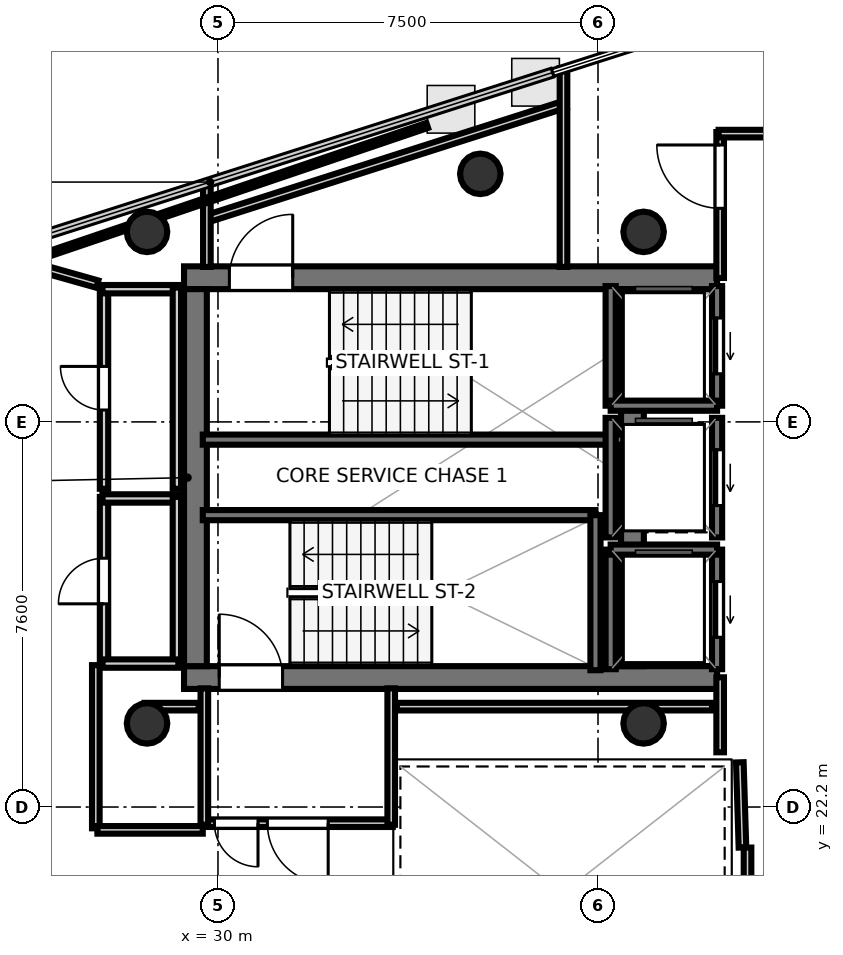
"""IFC4 building model, lengths in metres.
Left out: names, types, materials, properties, quantities, classifications, styles, units other than length and angle.
Written with IfcOpenShell. Run it as: python <this file> out.ifc"""

import sys

from ifc_helpers import new_model, si_unit, direction, frame, frame_2d, origin, origin_2d, place, context, subcontext, project, spatial, rectangle, hollow_circle, extrude, element, fill, save


model = new_model("IFC4")
c1 = context("Model", 3, precision=1e-05, world=origin(), true_north=direction((0.0, 1.0)))
c2 = subcontext(c1, "Body", "Model", "MODEL_VIEW")
j1 = project(units=[si_unit("LENGTHUNIT", "METRE"), si_unit("PLANEANGLEUNIT", "RADIAN")], contexts=[c1])
p1 = place(None, origin())
s1 = spatial("IfcSite", under=j1, at=p1, CompositionType="ELEMENT")
p2 = place(p1, origin())
s2 = spatial("IfcBuilding", under=s1, at=p2, CompositionType="ELEMENT")
p3 = place(p2, frame((0.0, 0.0, 329.6)))
s3 = spatial("IfcBuildingStorey", under=s2, at=p3, CompositionType="ELEMENT", Elevation=329.6)
p4 = place(p3, frame((29.33, 32.645, 0.0), z_axis=(0.0, 0.0, 1.0), x_axis=(1.0, 0.0, 0.0)))
e1 = element("IfcWall", 1, at=p4, inside=s3, PredefinedType="SHEAR", context=c2, shape_type="SweptSolid", body=[
    extrude(rectangle(XDim=10.52, YDim=0.45, at=frame_2d((5.26, 0.0))), origin(), (0.0, 0.0, 1.0), 3.52),
])
p5 = place(p4, frame((0.895, 0.0, 0.0)))
e2 = element("IfcOpeningElement", 2, at=p5, cuts=e1, PredefinedType="OPENING", context=c2, shape_type="SweptSolid", body=[
    extrude(rectangle(XDim=1.25, YDim=2.15, at=frame_2d((0.625, 1.075))), frame((0.0, 0.235, 0.0), z_axis=(0.0, -1.0, 0.0), x_axis=(1.0, 0.0, 0.0)), (0.0, 0.0, 1.0), 0.47),
])
p6 = place(p3, frame((29.33, 24.755, 0.0), z_axis=(0.0, 0.0, 1.0), x_axis=(1.0, 0.0, 0.0)))
e3 = element("IfcWall", 3, at=p6, inside=s3, PredefinedType="SHEAR", context=c2, shape_type="SweptSolid", body=[
    extrude(rectangle(XDim=10.52, YDim=0.45, at=frame_2d((5.26, 0.0))), origin(), (0.0, 0.0, 1.0), 3.52),
])
p7 = place(p6, frame((0.695, 0.0, 0.0)))
e4 = element("IfcOpeningElement", 4, at=p7, cuts=e3, PredefinedType="OPENING", context=c2, shape_type="SweptSolid", body=[
    extrude(rectangle(XDim=1.25, YDim=2.15, at=frame_2d((0.625, 1.075))), frame((0.0, 0.235, 0.0), z_axis=(0.0, -1.0, 0.0), x_axis=(1.0, 0.0, 0.0)), (0.0, 0.0, 1.0), 0.47),
])
for number, where, z_axis, x_axis in (
    (5, (29.555, 24.98, 0.0), (0.0, 0.0, 1.0), (0.0, 1.0, 0.0)),
    (6, (38.18, 24.98, 0.0), (0.0, 0.0, 1.0), (0.0, 1.0, 0.0)),
):
    element("IfcWall", number, at=place(p3, frame(where, z_axis=z_axis, x_axis=x_axis)), inside=s3, PredefinedType="SHEAR", context=c2, shape_type="SweptSolid", body=[
        extrude(rectangle(XDim=7.44, YDim=0.45, at=frame_2d((3.72, 0.0))), origin(), (0.0, 0.0, 1.0), 3.52),
    ])
for number, where, z_axis, x_axis in (
    (7, (28.6, 33.55, 0.0), (0.0, 0.0, 1.0), (1.0, 0.0, 0.0)),
    (8, (28.6, 23.85, 0.0), (0.0, 0.0, 1.0), (1.0, 0.0, 0.0)),
    (9, (38.4, 33.55, 0.0), (0.0, 0.0, 1.0), (1.0, 0.0, 0.0)),
    (10, (38.4, 23.85, 0.0), (0.0, 0.0, 1.0), (1.0, 0.0, 0.0)),
    (11, (35.177, 34.695, 0.0), (0.0, 0.0, 1.0), (1.0, 0.0, 0.0)),
):
    element("IfcColumn", number, at=place(p3, frame(where, z_axis=z_axis, x_axis=x_axis)), inside=s3, PredefinedType="COLUMN", context=c2, shape_type="SweptSolid", body=[
        extrude(hollow_circle(Radius=0.4, WallThickness=0.022, at=origin_2d()), origin(), (0.0, 0.0, 1.0), 3.7),
    ])
p8 = place(p3, frame((29.7, 29.45, 0.0), z_axis=(0.0, 0.0, 1.0), x_axis=(1.0, 0.0, 0.0)))
e12 = element("IfcWall", 12, at=p8, inside=s3, PredefinedType="SOLIDWALL", context=c2, shape_type="SweptSolid", body=[
    extrude(rectangle(XDim=8.3, YDim=0.2, at=frame_2d((4.15, 0.0))), origin(), (0.0, 0.0, 1.0), 3.52),
])
p9 = place(p3, frame((29.7, 27.96, 0.0), z_axis=(0.0, 0.0, 1.0), x_axis=(1.0, 0.0, 0.0)))
e13 = element("IfcWall", 13, at=p9, inside=s3, PredefinedType="SOLIDWALL", context=c2, shape_type="SweptSolid", body=[
    extrude(rectangle(XDim=7.75, YDim=0.2, at=frame_2d((3.875, 0.0))), origin(), (0.0, 0.0, 1.0), 3.52),
])
p10 = place(p3, frame((37.45, 24.9, 0.0), z_axis=(0.0, 0.0, 1.0), x_axis=(0.0, 1.0, 0.0)))
e14 = element("IfcWall", 14, at=p10, inside=s3, PredefinedType="SOLIDWALL", context=c2, shape_type="SweptSolid", body=[
    extrude(rectangle(XDim=3.06, YDim=0.2, at=frame_2d((1.53, 0.0))), origin(), (0.0, 0.0, 1.0), 3.52),
])
p11 = place(p3, frame((39.85, 30.12, 0.0), z_axis=(0.0, 0.0, 1.0), x_axis=(0.0, 1.0, 0.0)))
e15 = element("IfcWall", 15, at=p11, inside=s3, PredefinedType="SOLIDWALL", context=c2, shape_type="SweptSolid", body=[
    extrude(rectangle(XDim=2.36, YDim=0.2, at=frame_2d((1.18, 0.0))), origin(), (0.0, 0.0, 1.0), 3.52),
])
p12 = place(p11, frame((0.63, 0.0, 0.0)))
e16 = element("IfcOpeningElement", 16, at=p12, cuts=e15, PredefinedType="OPENING", context=c2, shape_type="SweptSolid", body=[
    extrude(rectangle(XDim=1.1, YDim=2.15, at=frame_2d((0.55, 1.075))), frame((0.0, 0.11, 0.0), z_axis=(0.0, -1.0, 0.0), x_axis=(1.0, 0.0, 0.0)), (0.0, 0.0, 1.0), 0.22),
])
p13 = place(p3, frame((37.75, 30.12, 0.0), z_axis=(0.0, 0.0, 1.0), x_axis=(0.0, 1.0, 0.0)))
e17 = element("IfcWall", 17, at=p13, inside=s3, PredefinedType="SOLIDWALL", context=c2, shape_type="SweptSolid", body=[
    extrude(rectangle(XDim=2.36, YDim=0.2, at=frame_2d((1.18, 0.0))), origin(), (0.0, 0.0, 1.0), 3.52),
])
p14 = place(p3, frame((37.75, 30.12, 0.0), z_axis=(0.0, 0.0, 1.0), x_axis=(1.0, 0.0, 0.0)))
e18 = element("IfcWall", 18, at=p14, inside=s3, PredefinedType="SOLIDWALL", context=c2, shape_type="SweptSolid", body=[
    extrude(rectangle(XDim=2.1, YDim=0.2, at=frame_2d((1.05, 0.0))), origin(), (0.0, 0.0, 1.0), 3.52),
])
p15 = place(p3, frame((39.85, 24.92, 0.0), z_axis=(0.0, 0.0, 1.0), x_axis=(0.0, 1.0, 0.0)))
e19 = element("IfcWall", 19, at=p15, inside=s3, PredefinedType="SOLIDWALL", context=c2, shape_type="SweptSolid", body=[
    extrude(rectangle(XDim=2.36, YDim=0.2, at=frame_2d((1.18, 0.0))), origin(), (0.0, 0.0, 1.0), 3.52),
])
p16 = place(p15, frame((0.63, 0.0, 0.0)))
e20 = element("IfcOpeningElement", 20, at=p16, cuts=e19, PredefinedType="OPENING", context=c2, shape_type="SweptSolid", body=[
    extrude(rectangle(XDim=1.1, YDim=2.15, at=frame_2d((0.55, 1.075))), frame((0.0, 0.11, 0.0), z_axis=(0.0, -1.0, 0.0), x_axis=(1.0, 0.0, 0.0)), (0.0, 0.0, 1.0), 0.22),
])
p17 = place(p3, frame((37.75, 24.92, 0.0), z_axis=(0.0, 0.0, 1.0), x_axis=(0.0, 1.0, 0.0)))
e21 = element("IfcWall", 21, at=p17, inside=s3, PredefinedType="SOLIDWALL", context=c2, shape_type="SweptSolid", body=[
    extrude(rectangle(XDim=2.36, YDim=0.2, at=frame_2d((1.18, 0.0))), origin(), (0.0, 0.0, 1.0), 3.52),
])
p18 = place(p3, frame((37.75, 27.28, 0.0), z_axis=(0.0, 0.0, 1.0), x_axis=(1.0, 0.0, 0.0)))
e22 = element("IfcWall", 22, at=p18, inside=s3, PredefinedType="SOLIDWALL", context=c2, shape_type="SweptSolid", body=[
    extrude(rectangle(XDim=2.1, YDim=0.2, at=frame_2d((1.05, 0.0))), origin(), (0.0, 0.0, 1.0), 3.52),
])
p19 = place(p3, frame((39.85, 27.52, 0.0), z_axis=(0.0, 0.0, 1.0), x_axis=(0.0, 1.0, 0.0)))
e23 = element("IfcWall", 23, at=p19, inside=s3, PredefinedType="SOLIDWALL", context=c2, shape_type="SweptSolid", body=[
    extrude(rectangle(XDim=2.36, YDim=0.2, at=frame_2d((1.18, 0.0))), origin(), (0.0, 0.0, 1.0), 3.52),
])
p20 = place(p19, frame((0.63, 0.0, 0.0)))
e24 = element("IfcOpeningElement", 24, at=p20, cuts=e23, PredefinedType="OPENING", context=c2, shape_type="SweptSolid", body=[
    extrude(rectangle(XDim=1.1, YDim=2.15, at=frame_2d((0.55, 1.075))), frame((0.0, 0.11, 0.0), z_axis=(0.0, -1.0, 0.0), x_axis=(1.0, 0.0, 0.0)), (0.0, 0.0, 1.0), 0.22),
])
p21 = place(p3, frame((37.75, 27.52, 0.0), z_axis=(0.0, 0.0, 1.0), x_axis=(0.0, 1.0, 0.0)))
e25 = element("IfcWall", 25, at=p21, inside=s3, PredefinedType="SOLIDWALL", context=c2, shape_type="SweptSolid", body=[
    extrude(rectangle(XDim=2.36, YDim=0.2, at=frame_2d((1.18, 0.0))), origin(), (0.0, 0.0, 1.0), 3.52),
])
p22 = place(p3, frame((29.76, 33.802, 0.0), z_axis=(0.0, 0.0, 1.0), x_axis=(0.952518417837, 0.304480974252, 0.0)))
e26 = element("IfcWall", 26, at=p22, inside=s3, PredefinedType="PARTITIONING", context=c2, shape_type="SweptSolid", body=[
    extrude(rectangle(XDim=7.454, YDim=0.15, at=frame_2d((3.727, 0.0))), origin(), (0.0, 0.0, 1.0), 2.84),
])
p23 = place(p3, frame((36.819, 36.783, 0.0), z_axis=(0.0, 0.0, 1.0), x_axis=(0.0, -1.0, 0.0)))
e27 = element("IfcWall", 27, at=p23, inside=s3, PredefinedType="PARTITIONING", context=c2, shape_type="SweptSolid", body=[
    extrude(rectangle(XDim=3.925, YDim=0.15, at=frame_2d((1.962, 0.0))), origin(), (0.0, 0.0, 1.0), 2.84),
])
p24 = place(p3, frame((29.781, 32.858, 0.0), z_axis=(0.0, 0.0, 1.0), x_axis=(0.0, 1.0, 0.0)))
e28 = element("IfcWall", 28, at=p24, inside=s3, PredefinedType="PARTITIONING", context=c2, shape_type="SweptSolid", body=[
    extrude(rectangle(XDim=1.675, YDim=0.15, at=frame_2d((0.838, 0.0))), origin(), (0.0, 0.0, 1.0), 2.84),
])
p25 = place(p3, frame((33.45, 21.881, 0.0), z_axis=(0.0, 0.0, 1.0), x_axis=(-1.0, 0.0, 0.0)))
e29 = element("IfcWall", 29, at=p25, inside=s3, PredefinedType="PARTITIONING", context=c2, shape_type="SweptSolid", body=[
    extrude(rectangle(XDim=3.75, YDim=0.15, at=frame_2d((1.875, 0.0))), origin(), (0.0, 0.0, 1.0), 2.84),
])
p26 = place(p25, frame((1.275, 0.0, 0.0)))
e30 = element("IfcOpeningElement", 30, at=p26, cuts=e29, PredefinedType="OPENING", context=c2, shape_type="SweptSolid", body=[
    extrude(rectangle(XDim=1.2, YDim=2.15, at=frame_2d((0.6, 1.075))), frame((0.0, 0.085, 0.0), z_axis=(0.0, -1.0, 0.0), x_axis=(1.0, 0.0, 0.0)), (0.0, 0.0, 1.0), 0.17),
])
p27 = place(p25, frame((2.66, 0.0, 0.0)))
e31 = element("IfcOpeningElement", 31, at=p27, cuts=e29, PredefinedType="OPENING", context=c2, shape_type="SweptSolid", body=[
    extrude(rectangle(XDim=0.86, YDim=2.05, at=frame_2d((0.43, 1.025))), frame((0.0, 0.085, 0.0), z_axis=(0.0, -1.0, 0.0), x_axis=(1.0, 0.0, 0.0)), (0.0, 0.0, 1.0), 0.17),
])
for number, where, z_axis, x_axis in (
    (32, (29.731, 21.85, 0.0), (0.0, 0.0, 1.0), (0.0, 1.0, 0.0)),
    (33, (33.419, 24.542, 0.0), (0.0, 0.0, 1.0), (0.0, -1.0, 0.0)),
):
    element("IfcWall", number, at=place(p3, frame(where, z_axis=z_axis, x_axis=x_axis)), inside=s3, PredefinedType="PARTITIONING", context=c2, shape_type="SweptSolid", body=[
        extrude(rectangle(XDim=2.692, YDim=0.15, at=frame_2d((1.346, 0.0))), origin(), (0.0, 0.0, 1.0), 2.84),
    ])
p28 = place(p3, frame((40.351, 21.401, 0.0), z_axis=(0.0, 0.0, 1.0), x_axis=(-0.031058045979, 0.999517582527, 0.0)))
e34 = element("IfcWall", 34, at=p28, inside=s3, PredefinedType="PARTITIONING", context=c2, shape_type="SweptSolid", body=[
    extrude(rectangle(XDim=1.682, YDim=0.15, at=frame_2d((0.841, 0.0))), origin(), (0.0, 0.0, 1.0), 2.84),
])
p29 = place(p3, frame((39.911, 23.28, 0.0), z_axis=(0.0, 0.0, 1.0), x_axis=(0.0, 1.0, 0.0)))
e35 = element("IfcWall", 35, at=p29, inside=s3, PredefinedType="PARTITIONING", context=c2, shape_type="SweptSolid", body=[
    extrude(rectangle(XDim=1.48, YDim=0.15, at=frame_2d((0.74, 0.0))), origin(), (0.0, 0.0, 1.0), 2.84),
])
p30 = place(p3, frame((39.911, 32.64, 0.0), z_axis=(0.0, 0.0, 1.0), x_axis=(0.0, 1.0, 0.0)))
e36 = element("IfcWall", 36, at=p30, inside=s3, PredefinedType="PARTITIONING", context=c2, shape_type="SweptSolid", body=[
    extrude(rectangle(XDim=2.88, YDim=0.15, at=frame_2d((1.44, 0.0))), origin(), (0.0, 0.0, 1.0), 2.84),
])
p31 = place(p30, frame((1.375, 0.0, 0.0)))
e37 = element("IfcOpeningElement", 37, at=p31, cuts=e36, PredefinedType="OPENING", context=c2, shape_type="SweptSolid", body=[
    extrude(rectangle(XDim=1.25, YDim=2.2, at=frame_2d((0.625, 1.1))), frame((0.0, 0.085, 0.0), z_axis=(0.0, -1.0, 0.0), x_axis=(1.0, 0.0, 0.0)), (0.0, 0.0, 1.0), 0.17),
])
p32 = place(p3, frame((39.88, 35.489, 0.0), z_axis=(0.0, 0.0, 1.0), x_axis=(1.0, 0.0, 0.0)))
e38 = element("IfcWall", 38, at=p32, inside=s3, PredefinedType="PARTITIONING", context=c2, shape_type="SweptSolid", body=[
    extrude(rectangle(XDim=1.48, YDim=0.15, at=frame_2d((0.74, 0.0))), origin(), (0.0, 0.0, 1.0), 2.84),
])
p33 = place(p3, frame((40.451, 18.08, 0.0), z_axis=(0.0, 0.0, 1.0), x_axis=(0.0, 1.0, 0.0)))
e39 = element("IfcWall", 39, at=p33, inside=s3, PredefinedType="PARTITIONING", context=c2, shape_type="SweptSolid", body=[
    extrude(rectangle(XDim=3.32, YDim=0.15, at=frame_2d((1.66, 0.0))), origin(), (0.0, 0.0, 1.0), 2.84),
])
p34 = place(p3, frame((27.751, 25.0, 0.0), z_axis=(0.0, 0.0, 1.0), x_axis=(0.0, 1.0, 0.0)))
e40 = element("IfcWall", 40, at=p34, inside=s3, PredefinedType="PLUMBINGWALL", context=c2, shape_type="SweptSolid", body=[
    extrude(rectangle(XDim=3.32, YDim=0.165, at=frame_2d((1.66, 0.0))), origin(), (0.0, 0.0, 1.0), 2.84),
])
p35 = place(p34, frame((1.21, 0.0, 0.0)))
e41 = element("IfcOpeningElement", 41, at=p35, cuts=e40, PredefinedType="OPENING", context=c2, shape_type="SweptSolid", body=[
    extrude(rectangle(XDim=0.9, YDim=2.1, at=frame_2d((0.45, 1.05))), frame((0.0, 0.093, 0.0), z_axis=(0.0, -1.0, 0.0), x_axis=(1.0, 0.0, 0.0)), (0.0, 0.0, 1.0), 0.185),
])
p36 = place(p3, frame((27.72, 28.289, 0.0), z_axis=(0.0, 0.0, 1.0), x_axis=(1.0, 0.0, 0.0)))
e42 = element("IfcWall", 42, at=p36, inside=s3, PredefinedType="PLUMBINGWALL", context=c2, shape_type="SweptSolid", body=[
    extrude(rectangle(XDim=1.5, YDim=0.165, at=frame_2d((0.75, 0.0))), origin(), (0.0, 0.0, 1.0), 2.84),
])
p37 = place(p3, frame((29.189, 28.32, 0.0), z_axis=(0.0, 0.0, 1.0), x_axis=(0.0, -1.0, 0.0)))
e43 = element("IfcWall", 43, at=p37, inside=s3, PredefinedType="PLUMBINGWALL", context=c2, shape_type="SweptSolid", body=[
    extrude(rectangle(XDim=3.32, YDim=0.165, at=frame_2d((1.66, 0.0))), origin(), (0.0, 0.0, 1.0), 2.84),
])
p38 = place(p3, frame((29.22, 25.031, 0.0), z_axis=(0.0, 0.0, 1.0), x_axis=(-1.0, 0.0, 0.0)))
e44 = element("IfcWall", 44, at=p38, inside=s3, PredefinedType="PLUMBINGWALL", context=c2, shape_type="SweptSolid", body=[
    extrude(rectangle(XDim=1.5, YDim=0.165, at=frame_2d((0.75, 0.0))), origin(), (0.0, 0.0, 1.0), 2.84),
])
p39 = place(p3, frame((27.751, 28.48, 0.0), z_axis=(0.0, 0.0, 1.0), x_axis=(0.0, 1.0, 0.0)))
e45 = element("IfcWall", 45, at=p39, inside=s3, PredefinedType="PLUMBINGWALL", context=c2, shape_type="SweptSolid", body=[
    extrude(rectangle(XDim=3.97, YDim=0.165, at=frame_2d((1.985, 0.0))), origin(), (0.0, 0.0, 1.0), 2.84),
])
p40 = place(p39, frame((1.555, 0.0, 0.0)))
e46 = element("IfcOpeningElement", 46, at=p40, cuts=e45, PredefinedType="OPENING", context=c2, shape_type="SweptSolid", body=[
    extrude(rectangle(XDim=0.86, YDim=2.05, at=frame_2d((0.43, 1.025))), frame((0.0, 0.093, 0.0), z_axis=(0.0, -1.0, 0.0), x_axis=(1.0, 0.0, 0.0)), (0.0, 0.0, 1.0), 0.185),
])
p41 = place(p3, frame((27.72, 32.419, 0.0), z_axis=(0.0, 0.0, 1.0), x_axis=(1.0, 0.0, 0.0)))
e47 = element("IfcWall", 47, at=p41, inside=s3, PredefinedType="PLUMBINGWALL", context=c2, shape_type="SweptSolid", body=[
    extrude(rectangle(XDim=1.5, YDim=0.165, at=frame_2d((0.75, 0.0))), origin(), (0.0, 0.0, 1.0), 2.84),
])
p42 = place(p3, frame((29.189, 32.45, 0.0), z_axis=(0.0, 0.0, 1.0), x_axis=(0.0, -1.0, 0.0)))
e48 = element("IfcWall", 48, at=p42, inside=s3, PredefinedType="PLUMBINGWALL", context=c2, shape_type="SweptSolid", body=[
    extrude(rectangle(XDim=3.97, YDim=0.165, at=frame_2d((1.985, 0.0))), origin(), (0.0, 0.0, 1.0), 2.84),
])
p43 = place(p3, frame((29.62, 24.181, 0.0), z_axis=(0.0, 0.0, 1.0), x_axis=(-1.0, 0.0, 0.0)))
e49 = element("IfcWall", 49, at=p43, inside=s3, PredefinedType="PARTITIONING", context=c2, shape_type="SweptSolid", body=[
    extrude(rectangle(XDim=1.07, YDim=0.15, at=frame_2d((0.535, 0.0))), origin(), (0.0, 0.0, 1.0), 2.84),
])
p44 = place(p3, frame((39.75, 24.181, 0.0), z_axis=(0.0, 0.0, 1.0), x_axis=(-1.0, 0.0, 0.0)))
e50 = element("IfcWall", 50, at=p44, inside=s3, PredefinedType="PARTITIONING", context=c2, shape_type="SweptSolid", body=[
    extrude(rectangle(XDim=6.22, YDim=0.15, at=frame_2d((3.11, 0.0))), origin(), (0.0, 0.0, 1.0), 2.84),
])
p45 = place(p3, frame((25.455, 33.13, 0.0), z_axis=(0.0, 0.0, 1.0), x_axis=(0.962415505335, -0.271581286342, 0.0)))
e51 = element("IfcWall", 51, at=p45, inside=s3, PredefinedType="PARTITIONING", context=c2, shape_type="SweptSolid", body=[
    extrude(rectangle(XDim=2.25, YDim=0.15, at=frame_2d((1.125, 0.0))), origin(), (0.0, 0.0, 1.0), 2.84),
])
p46 = place(p3, frame((27.589, 25.0, 0.0), z_axis=(0.0, 0.0, 1.0), x_axis=(0.0, -1.0, 0.0)))
e52 = element("IfcWall", 52, at=p46, inside=s3, PredefinedType="PARTITIONING", context=c2, shape_type="SweptSolid", body=[
    extrude(rectangle(XDim=3.22, YDim=0.15, at=frame_2d((1.61, 0.0))), origin(), (0.0, 0.0, 1.0), 2.84),
])
p47 = place(p3, frame((27.62, 21.749, 0.0), z_axis=(0.0, 0.0, 1.0), x_axis=(1.0, 0.0, 0.0)))
e53 = element("IfcWall", 53, at=p47, inside=s3, PredefinedType="PARTITIONING", context=c2, shape_type="SweptSolid", body=[
    extrude(rectangle(XDim=2.08, YDim=0.15, at=frame_2d((1.04, 0.0))), origin(), (0.0, 0.0, 1.0), 2.84),
])
p48 = place(p3, frame((18.964, 30.503, 0.0), z_axis=(0.0, 0.0, 1.0), x_axis=(0.946932723681, 0.321431822977, 0.0)))
e54 = element("IfcWall", 54, at=p48, inside=s3, PredefinedType="PARTITIONING", context=c2, shape_type="SweptSolid", body=[
    extrude(rectangle(XDim=16.016, YDim=0.105, at=frame_2d((8.008, 0.0))), origin(), (0.0, 0.0, 1.0), 2.84),
])
p49 = place(p3, frame((54.17, 39.373, 0.0), z_axis=(0.0, 0.0, 1.0), x_axis=(-0.399821133612, -0.916593181907, 0.0)))
e55 = element("IfcWall", 55, at=p49, inside=s3, PredefinedType="PARTITIONING", context=c2, shape_type="SweptSolid", body=[
    extrude(rectangle(XDim=34.925, YDim=0.12, at=frame_2d((17.462, 0.0))), origin(), (0.0, 0.0, 1.0), 2.84),
])
p50 = place(p5, origin())
e56 = element("IfcDoor", 56, at=p50, inside=s3, OperationType="SINGLE_SWING_RIGHT", PredefinedType="DOOR", context=c2, shape_type="SweptSolid", body=[
    extrude(rectangle(XDim=1.25, YDim=2.15, at=frame_2d((0.625, 1.075))), frame((0.0, 0.025, 0.0), z_axis=(0.0, -1.0, 0.0), x_axis=(1.0, 0.0, 0.0)), (0.0, 0.0, 1.0), 0.05),
])
fill(e2, e56)
p51 = place(p7, origin())
e57 = element("IfcDoor", 57, at=p51, inside=s3, OperationType="SINGLE_SWING_LEFT", PredefinedType="DOOR", context=c2, shape_type="SweptSolid", body=[
    extrude(rectangle(XDim=1.25, YDim=2.15, at=frame_2d((0.625, 1.075))), frame((0.0, 0.025, 0.0), z_axis=(0.0, -1.0, 0.0), x_axis=(1.0, 0.0, 0.0)), (0.0, 0.0, 1.0), 0.05),
])
fill(e4, e57)
p52 = place(p12, origin())
e58 = element("IfcDoor", 58, at=p52, inside=s3, OperationType="SLIDING_TO_LEFT", PredefinedType="DOOR", context=c2, shape_type="SweptSolid", body=[
    extrude(rectangle(XDim=1.1, YDim=2.15, at=frame_2d((0.55, 1.075))), frame((0.0, 0.025, 0.0), z_axis=(0.0, -1.0, 0.0), x_axis=(1.0, 0.0, 0.0)), (0.0, 0.0, 1.0), 0.05),
])
fill(e16, e58)
p53 = place(p16, origin())
e59 = element("IfcDoor", 59, at=p53, inside=s3, OperationType="SLIDING_TO_LEFT", PredefinedType="DOOR", context=c2, shape_type="SweptSolid", body=[
    extrude(rectangle(XDim=1.1, YDim=2.15, at=frame_2d((0.55, 1.075))), frame((0.0, 0.025, 0.0), z_axis=(0.0, -1.0, 0.0), x_axis=(1.0, 0.0, 0.0)), (0.0, 0.0, 1.0), 0.05),
])
fill(e20, e59)
p54 = place(p20, origin())
e60 = element("IfcDoor", 60, at=p54, inside=s3, OperationType="SLIDING_TO_LEFT", PredefinedType="DOOR", context=c2, shape_type="SweptSolid", body=[
    extrude(rectangle(XDim=1.1, YDim=2.15, at=frame_2d((0.55, 1.075))), frame((0.0, 0.025, 0.0), z_axis=(0.0, -1.0, 0.0), x_axis=(1.0, 0.0, 0.0)), (0.0, 0.0, 1.0), 0.05),
])
fill(e24, e60)
p55 = place(p26, origin())
e61 = element("IfcDoor", 61, at=p55, inside=s3, OperationType="SINGLE_SWING_LEFT", PredefinedType="DOOR", context=c2, shape_type="SweptSolid", body=[
    extrude(rectangle(XDim=1.2, YDim=2.15, at=frame_2d((0.6, 1.075))), frame((0.0, 0.025, 0.0), z_axis=(0.0, -1.0, 0.0), x_axis=(1.0, 0.0, 0.0)), (0.0, 0.0, 1.0), 0.05),
])
fill(e30, e61)
p56 = place(p35, origin())
e62 = element("IfcDoor", 62, at=p56, inside=s3, OperationType="SINGLE_SWING_LEFT", PredefinedType="DOOR", context=c2, shape_type="SweptSolid", body=[
    extrude(rectangle(XDim=0.9, YDim=2.1, at=frame_2d((0.45, 1.05))), frame((0.0, 0.025, 0.0), z_axis=(0.0, -1.0, 0.0), x_axis=(1.0, 0.0, 0.0)), (0.0, 0.0, 1.0), 0.05),
])
fill(e41, e62)
p57 = place(p40, origin())
e63 = element("IfcDoor", 63, at=p57, inside=s3, OperationType="SINGLE_SWING_RIGHT", PredefinedType="DOOR", context=c2, shape_type="SweptSolid", body=[
    extrude(rectangle(XDim=0.86, YDim=2.05, at=frame_2d((0.43, 1.025))), frame((0.0, 0.025, 0.0), z_axis=(0.0, -1.0, 0.0), x_axis=(1.0, 0.0, 0.0)), (0.0, 0.0, 1.0), 0.05),
])
fill(e46, e63)
p58 = place(p27, origin())
e64 = element("IfcDoor", 64, at=p58, inside=s3, OperationType="SINGLE_SWING_LEFT", PredefinedType="DOOR", context=c2, shape_type="SweptSolid", body=[
    extrude(rectangle(XDim=0.86, YDim=2.05, at=frame_2d((0.43, 1.025))), frame((0.0, 0.025, 0.0), z_axis=(0.0, -1.0, 0.0), x_axis=(1.0, 0.0, 0.0)), (0.0, 0.0, 1.0), 0.05),
])
fill(e31, e64)
p59 = place(p31, origin())
e65 = element("IfcDoor", 65, at=p59, inside=s3, OperationType="SINGLE_SWING_RIGHT", PredefinedType="DOOR", context=c2, shape_type="SweptSolid", body=[
    extrude(rectangle(XDim=1.25, YDim=2.2, at=frame_2d((0.625, 1.1))), frame((0.0, 0.025, 0.0), z_axis=(0.0, -1.0, 0.0), x_axis=(1.0, 0.0, 0.0)), (0.0, 0.0, 1.0), 0.05),
])
fill(e37, e65)
save(model, sys.argv[1])
